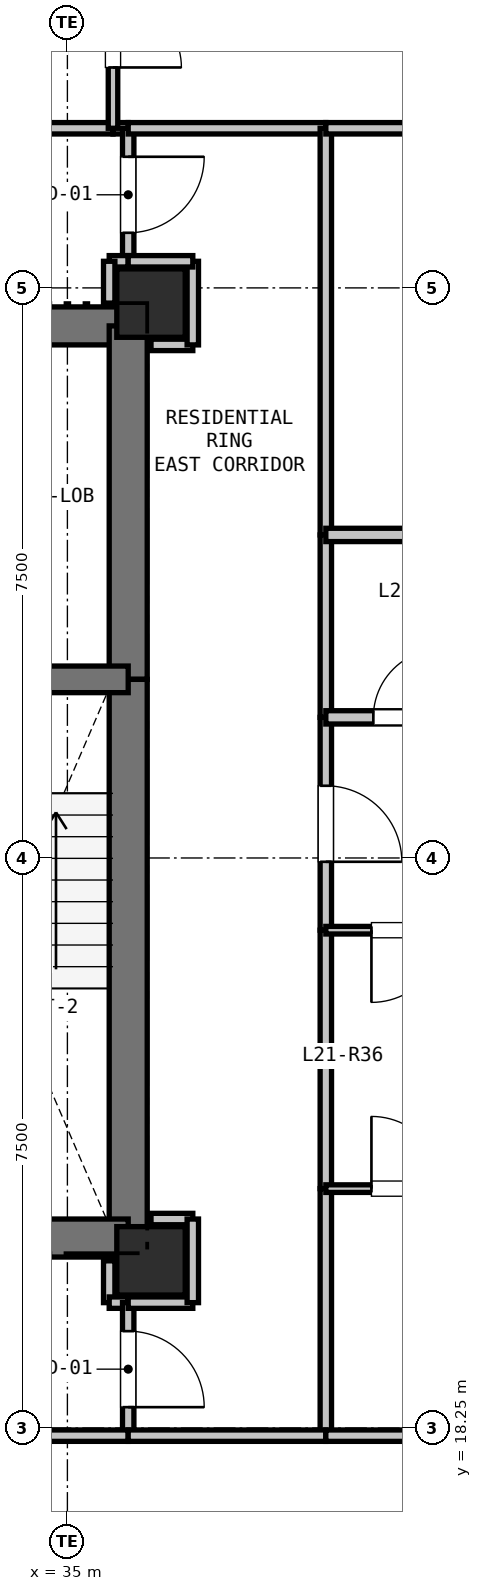
"""IFC4 building model, lengths in metres.
Left out: names, types, materials, properties, quantities, classifications, styles, units other than length and angle.
Written with IfcOpenShell. Run it as: python <this file> out.ifc"""

import sys

from ifc_helpers import new_model, si_unit, direction, frame, frame_2d, origin, origin_2d, place, context, subcontext, project, spatial, rectangle, extrude, element, fill, save


model = new_model("IFC4")
c1 = context("Model", 3, precision=1e-05, world=origin(), true_north=direction((0.0, 1.0)))
c2 = subcontext(c1, "Body", "Model", "MODEL_VIEW")
j1 = project(units=[si_unit("LENGTHUNIT", "METRE"), si_unit("PLANEANGLEUNIT", "RADIAN")], contexts=[c1])
p1 = place(None, origin())
s1 = spatial("IfcSite", under=j1, at=p1, CompositionType="ELEMENT")
p2 = place(p1, origin())
s2 = spatial("IfcBuilding", under=s1, at=p2, CompositionType="ELEMENT")
p3 = place(p2, frame((0.0, 0.0, 80.1)))
s3 = spatial("IfcBuildingStorey", under=s2, at=p3, CompositionType="ELEMENT", Elevation=80.1)
for number, where, z_axis, x_axis in (
    (1, (36.1, 33.05, 0.0), (0.0, 0.0, 1.0), (1.0, 0.0, 0.0)),
    (2, (36.1, 20.45, 0.0), (0.0, 0.0, 1.0), (1.0, 0.0, 0.0)),
):
    element("IfcColumn", number, at=place(p3, frame(where, z_axis=z_axis, x_axis=x_axis)), inside=s3, PredefinedType="COLUMN", context=c2, shape_type="SweptSolid", body=[
        extrude(rectangle(XDim=0.9, YDim=0.9, at=origin_2d()), origin(), (0.0, 0.0, 1.0), 3.3),
    ])
p4 = place(p3, frame((32.35, 32.75, 0.0), z_axis=(0.0, 0.0, 1.0), x_axis=(1.0, 0.0, 0.0)))
e3 = element("IfcWall", 3, at=p4, inside=s3, PredefinedType="SHEAR", context=c2, shape_type="SweptSolid", body=[
    extrude(rectangle(XDim=3.45, YDim=0.5, at=frame_2d((1.725, 0.0))), origin(), (0.0, 0.0, 1.0), 3.05),
])
p5 = place(p4, frame((0.65, 0.0, 0.0)))
e4 = element("IfcOpeningElement", 4, at=p5, cuts=e3, PredefinedType="OPENING", context=c2, shape_type="SweptSolid", body=[
    extrude(rectangle(XDim=1.15, YDim=2.15, at=frame_2d((0.575, 1.075))), frame((0.0, 0.26, 0.0), z_axis=(0.0, -1.0, 0.0), x_axis=(1.0, 0.0, 0.0)), (0.0, 0.0, 1.0), 0.52),
])
p6 = place(p3, frame((35.8, 32.75, 0.0), z_axis=(0.0, 0.0, 1.0), x_axis=(0.0, -1.0, 0.0)))
e5 = element("IfcWall", 5, at=p6, inside=s3, PredefinedType="SHEAR", context=c2, shape_type="SweptSolid", body=[
    extrude(rectangle(XDim=4.65, YDim=0.5, at=frame_2d((2.325, 0.0))), origin(), (0.0, 0.0, 1.0), 3.05),
])
p7 = place(p3, frame((35.8, 28.1, 0.0), z_axis=(0.0, 0.0, 1.0), x_axis=(0.0, -1.0, 0.0)))
e6 = element("IfcWall", 6, at=p7, inside=s3, PredefinedType="SHEAR", context=c2, shape_type="SweptSolid", body=[
    extrude(rectangle(XDim=7.35, YDim=0.5, at=frame_2d((3.675, 0.0))), origin(), (0.0, 0.0, 1.0), 3.05),
])
p8 = place(p3, frame((35.8, 20.75, 0.0), z_axis=(0.0, 0.0, 1.0), x_axis=(-1.0, 0.0, 0.0)))
e7 = element("IfcWall", 7, at=p8, inside=s3, PredefinedType="SHEAR", context=c2, shape_type="SweptSolid", body=[
    extrude(rectangle(XDim=3.45, YDim=0.5, at=frame_2d((1.725, 0.0))), origin(), (0.0, 0.0, 1.0), 3.05),
])
p9 = place(p3, frame((32.35, 28.1, 0.0), z_axis=(0.0, 0.0, 1.0), x_axis=(1.0, 0.0, 0.0)))
e8 = element("IfcWall", 8, at=p9, inside=s3, PredefinedType="SHEAR", context=c2, shape_type="SweptSolid", body=[
    extrude(rectangle(XDim=3.45, YDim=0.35, at=frame_2d((1.725, 0.0))), origin(), (0.0, 0.0, 1.0), 3.05),
])
p10 = place(p9, frame((1.15, 0.0, 0.0)))
e9 = element("IfcOpeningElement", 9, at=p10, cuts=e8, PredefinedType="OPENING", context=c2, shape_type="SweptSolid", body=[
    extrude(rectangle(XDim=1.15, YDim=2.15, at=frame_2d((0.575, 1.075))), frame((0.0, 0.185, 0.0), z_axis=(0.0, -1.0, 0.0), x_axis=(1.0, 0.0, 0.0)), (0.0, 0.0, 1.0), 0.37),
])
p11 = place(p3, frame((35.55, 20.45, 0.0), z_axis=(0.0, 0.0, 1.0), x_axis=(0.0, -1.0, 0.0)))
e10 = element("IfcWall", 10, at=p11, inside=s3, PredefinedType="PARTITIONING", context=c2, shape_type="SweptSolid", body=[
    extrude(rectangle(XDim=0.55, YDim=0.15, at=frame_2d((0.275, 0.0))), origin(), (0.0, 0.0, 1.0), 2.498),
])
p12 = place(p3, frame((35.55, 19.9, 0.0), z_axis=(0.0, 0.0, 1.0), x_axis=(1.0, 0.0, 0.0)))
e11 = element("IfcWall", 11, at=p12, inside=s3, PredefinedType="PARTITIONING", context=c2, shape_type="SweptSolid", body=[
    extrude(rectangle(XDim=0.25, YDim=0.15, at=frame_2d((0.125, 0.0))), origin(), (0.0, 0.0, 1.0), 3.05),
])
p13 = place(p3, frame((35.8, 19.9, 0.0), z_axis=(0.0, 0.0, 1.0), x_axis=(0.0, -1.0, 0.0)))
e12 = element("IfcWall", 12, at=p13, inside=s3, PredefinedType="PARTITIONING", context=c2, shape_type="SweptSolid", body=[
    extrude(rectangle(XDim=1.75, YDim=0.15, at=frame_2d((0.875, 0.0))), origin(), (0.0, 0.0, 1.0), 3.05),
])
p14 = place(p13, frame((0.375, 0.0, 0.0)))
e13 = element("IfcOpeningElement", 13, at=p14, cuts=e12, PredefinedType="OPENING", context=c2, shape_type="SweptSolid", body=[
    extrude(rectangle(XDim=1.0, YDim=2.15, at=frame_2d((0.5, 1.075))), frame((0.0, 0.085, 0.0), z_axis=(0.0, -1.0, 0.0), x_axis=(1.0, 0.0, 0.0)), (0.0, 0.0, 1.0), 0.17),
])
p15 = place(p3, frame((35.8, 18.15, 0.0), z_axis=(0.0, 0.0, 1.0), x_axis=(-1.0, 0.0, 0.0)))
e14 = element("IfcWall", 14, at=p15, inside=s3, PredefinedType="PARTITIONING", context=c2, shape_type="SweptSolid", body=[
    extrude(rectangle(XDim=2.2, YDim=0.15, at=frame_2d((1.1, 0.0))), origin(), (0.0, 0.0, 1.0), 3.05),
])
p16 = place(p3, frame((32.0, 35.35, 0.0), z_axis=(0.0, 0.0, 1.0), x_axis=(1.0, 0.0, 0.0)))
e15 = element("IfcWall", 15, at=p16, inside=s3, PredefinedType="PARTITIONING", context=c2, shape_type="SweptSolid", body=[
    extrude(rectangle(XDim=3.6, YDim=0.15, at=frame_2d((1.8, 0.0))), origin(), (0.0, 0.0, 1.0), 3.05),
])
p17 = place(p3, frame((35.6, 35.35, 0.0), z_axis=(0.0, 0.0, 1.0), x_axis=(1.0, 0.0, 0.0)))
e16 = element("IfcWall", 16, at=p17, inside=s3, PredefinedType="PARTITIONING", context=c2, shape_type="SweptSolid", body=[
    extrude(rectangle(XDim=0.2, YDim=0.15, at=frame_2d((0.1, 0.0))), origin(), (0.0, 0.0, 1.0), 3.05),
])
p18 = place(p3, frame((35.8, 35.35, 0.0), z_axis=(0.0, 0.0, 1.0), x_axis=(0.0, -1.0, 0.0)))
e17 = element("IfcWall", 17, at=p18, inside=s3, PredefinedType="PARTITIONING", context=c2, shape_type="SweptSolid", body=[
    extrude(rectangle(XDim=1.75, YDim=0.15, at=frame_2d((0.875, 0.0))), origin(), (0.0, 0.0, 1.0), 3.05),
])
p19 = place(p18, frame((0.375, 0.0, 0.0)))
e18 = element("IfcOpeningElement", 18, at=p19, cuts=e17, PredefinedType="OPENING", context=c2, shape_type="SweptSolid", body=[
    extrude(rectangle(XDim=1.0, YDim=2.15, at=frame_2d((0.5, 1.075))), frame((0.0, 0.085, 0.0), z_axis=(0.0, -1.0, 0.0), x_axis=(1.0, 0.0, 0.0)), (0.0, 0.0, 1.0), 0.17),
])
p20 = place(p3, frame((35.8, 33.6, 0.0), z_axis=(0.0, 0.0, 1.0), x_axis=(-1.0, 0.0, 0.0)))
e19 = element("IfcWall", 19, at=p20, inside=s3, PredefinedType="PARTITIONING", context=c2, shape_type="SweptSolid", body=[
    extrude(rectangle(XDim=0.25, YDim=0.15, at=frame_2d((0.125, 0.0))), origin(), (0.0, 0.0, 1.0), 3.05),
])
p21 = place(p3, frame((35.55, 33.6, 0.0), z_axis=(0.0, 0.0, 1.0), x_axis=(0.0, -1.0, 0.0)))
e20 = element("IfcWall", 20, at=p21, inside=s3, PredefinedType="PARTITIONING", context=c2, shape_type="SweptSolid", body=[
    extrude(rectangle(XDim=0.55, YDim=0.15, at=frame_2d((0.275, 0.0))), origin(), (0.0, 0.0, 1.0), 2.498),
])
for number, where, z_axis, x_axis in (
    (21, (36.65, 21.0, 0.0), (0.0, 0.0, 1.0), (-1.0, 0.0, 0.0)),
    (22, (36.1, 32.5, 0.0), (0.0, 0.0, 1.0), (1.0, 0.0, 0.0)),
):
    element("IfcWall", number, at=place(p3, frame(where, z_axis=z_axis, x_axis=x_axis)), inside=s3, PredefinedType="PARTITIONING", context=c2, shape_type="SweptSolid", body=[
        extrude(rectangle(XDim=0.55, YDim=0.15, at=frame_2d((0.275, 0.0))), origin(), (0.0, 0.0, 1.0), 2.498),
    ])
p22 = place(p3, frame((36.65, 32.5, 0.0), z_axis=(0.0, 0.0, 1.0), x_axis=(0.0, 1.0, 0.0)))
e23 = element("IfcWall", 23, at=p22, inside=s3, PredefinedType="PARTITIONING", context=c2, shape_type="SweptSolid", body=[
    extrude(rectangle(XDim=1.1, YDim=0.15, at=frame_2d((0.55, 0.0))), origin(), (0.0, 0.0, 1.0), 2.423),
])
p23 = place(p3, frame((36.65, 33.6, 0.0), z_axis=(0.0, 0.0, 1.0), x_axis=(-1.0, 0.0, 0.0)))
e24 = element("IfcWall", 24, at=p23, inside=s3, PredefinedType="PARTITIONING", context=c2, shape_type="SweptSolid", body=[
    extrude(rectangle(XDim=0.85, YDim=0.15, at=frame_2d((0.425, 0.0))), origin(), (0.0, 0.0, 1.0), 2.423),
])
p24 = place(p3, frame((35.8, 35.35, 0.0), z_axis=(0.0, 0.0, 1.0), x_axis=(1.0, 0.0, 0.0)))
e25 = element("IfcWall", 25, at=p24, inside=s3, PredefinedType="PARTITIONING", context=c2, shape_type="SweptSolid", body=[
    extrude(rectangle(XDim=2.6, YDim=0.15, at=frame_2d((1.3, 0.0))), origin(), (0.0, 0.0, 1.0), 2.423),
])
p25 = place(p3, frame((38.4, 35.35, 0.0), z_axis=(0.0, 0.0, 1.0), x_axis=(0.0, -1.0, 0.0)))
e26 = element("IfcWall", 26, at=p25, inside=s3, PredefinedType="PARTITIONING", context=c2, shape_type="SweptSolid", body=[
    extrude(rectangle(XDim=5.35, YDim=0.15, at=frame_2d((2.675, 0.0))), origin(), (0.0, 0.0, 1.0), 3.05),
])
p26 = place(p3, frame((38.4, 30.0, 0.0), z_axis=(0.0, 0.0, 1.0), x_axis=(0.0, -1.0, 0.0)))
e27 = element("IfcWall", 27, at=p26, inside=s3, PredefinedType="PARTITIONING", context=c2, shape_type="SweptSolid", body=[
    extrude(rectangle(XDim=2.4, YDim=0.15, at=frame_2d((1.2, 0.0))), origin(), (0.0, 0.0, 1.0), 3.05),
])
p27 = place(p3, frame((38.4, 27.6, 0.0), z_axis=(0.0, 0.0, 1.0), x_axis=(0.0, -1.0, 0.0)))
e28 = element("IfcWall", 28, at=p27, inside=s3, PredefinedType="PARTITIONING", context=c2, shape_type="SweptSolid", body=[
    extrude(rectangle(XDim=2.8, YDim=0.15, at=frame_2d((1.4, 0.0))), origin(), (0.0, 0.0, 1.0), 3.05),
])
p28 = place(p27, frame((0.9, 0.0, 0.0)))
e29 = element("IfcOpeningElement", 29, at=p28, cuts=e28, PredefinedType="OPENING", context=c2, shape_type="SweptSolid", body=[
    extrude(rectangle(XDim=1.0, YDim=2.15, at=frame_2d((0.5, 1.075))), frame((0.0, 0.085, 0.0), z_axis=(0.0, -1.0, 0.0), x_axis=(1.0, 0.0, 0.0)), (0.0, 0.0, 1.0), 0.17),
])
p29 = place(p3, frame((38.4, 24.8, 0.0), z_axis=(0.0, 0.0, 1.0), x_axis=(0.0, -1.0, 0.0)))
e30 = element("IfcWall", 30, at=p29, inside=s3, PredefinedType="PARTITIONING", context=c2, shape_type="SweptSolid", body=[
    extrude(rectangle(XDim=3.4, YDim=0.15, at=frame_2d((1.7, 0.0))), origin(), (0.0, 0.0, 1.0), 3.05),
])
p30 = place(p3, frame((38.4, 21.4, 0.0), z_axis=(0.0, 0.0, 1.0), x_axis=(0.0, -1.0, 0.0)))
e31 = element("IfcWall", 31, at=p30, inside=s3, PredefinedType="PARTITIONING", context=c2, shape_type="SweptSolid", body=[
    extrude(rectangle(XDim=3.25, YDim=0.15, at=frame_2d((1.625, 0.0))), origin(), (0.0, 0.0, 1.0), 3.05),
])
p31 = place(p3, frame((38.4, 18.15, 0.0), z_axis=(0.0, 0.0, 1.0), x_axis=(-1.0, 0.0, 0.0)))
e32 = element("IfcWall", 32, at=p31, inside=s3, PredefinedType="PARTITIONING", context=c2, shape_type="SweptSolid", body=[
    extrude(rectangle(XDim=2.6, YDim=0.15, at=frame_2d((1.3, 0.0))), origin(), (0.0, 0.0, 1.0), 2.423),
])
p32 = place(p3, frame((35.8, 19.9, 0.0), z_axis=(0.0, 0.0, 1.0), x_axis=(1.0, 0.0, 0.0)))
e33 = element("IfcWall", 33, at=p32, inside=s3, PredefinedType="PARTITIONING", context=c2, shape_type="SweptSolid", body=[
    extrude(rectangle(XDim=0.85, YDim=0.15, at=frame_2d((0.425, 0.0))), origin(), (0.0, 0.0, 1.0), 2.423),
])
p33 = place(p3, frame((36.65, 19.9, 0.0), z_axis=(0.0, 0.0, 1.0), x_axis=(0.0, 1.0, 0.0)))
e34 = element("IfcWall", 34, at=p33, inside=s3, PredefinedType="PARTITIONING", context=c2, shape_type="SweptSolid", body=[
    extrude(rectangle(XDim=1.1, YDim=0.15, at=frame_2d((0.55, 0.0))), origin(), (0.0, 0.0, 1.0), 3.05),
])
p34 = place(p3, frame((40.55, 24.8, 0.0), z_axis=(0.0, 0.0, 1.0), x_axis=(-1.0, 0.0, 0.0)))
e35 = element("IfcWall", 35, at=p34, inside=s3, PredefinedType="PARTITIONING", context=c2, shape_type="SweptSolid", body=[
    extrude(rectangle(XDim=2.15, YDim=0.1, at=frame_2d((1.075, 0.0))), origin(), (0.0, 0.0, 1.0), 3.05),
])
p35 = place(p34, frame((0.6, 0.0, 0.0)))
e36 = element("IfcOpeningElement", 36, at=p35, cuts=e35, PredefinedType="OPENING", context=c2, shape_type="SweptSolid", body=[
    extrude(rectangle(XDim=0.95, YDim=2.1, at=frame_2d((0.475, 1.05))), frame((0.0, 0.06, 0.0), z_axis=(0.0, -1.0, 0.0), x_axis=(1.0, 0.0, 0.0)), (0.0, 0.0, 1.0), 0.12),
])
p36 = place(p3, frame((38.4, 27.6, 0.0), z_axis=(0.0, 0.0, 1.0), x_axis=(1.0, 0.0, 0.0)))
e37 = element("IfcWall", 37, at=p36, inside=s3, PredefinedType="PLUMBINGWALL", context=c2, shape_type="SweptSolid", body=[
    extrude(rectangle(XDim=2.15, YDim=0.175, at=frame_2d((1.075, 0.0))), origin(), (0.0, 0.0, 1.0), 3.05),
])
p37 = place(p36, frame((0.625, 0.0, 0.0)))
e38 = element("IfcOpeningElement", 38, at=p37, cuts=e37, PredefinedType="OPENING", context=c2, shape_type="SweptSolid", body=[
    extrude(rectangle(XDim=0.9, YDim=2.1, at=frame_2d((0.45, 1.05))), frame((0.0, 0.097, 0.0), z_axis=(0.0, -1.0, 0.0), x_axis=(1.0, 0.0, 0.0)), (0.0, 0.0, 1.0), 0.195),
])
p38 = place(p3, frame((35.6, 37.85, 0.0), z_axis=(0.0, 0.0, 1.0), x_axis=(0.0, -1.0, 0.0)))
e39 = element("IfcWall", 39, at=p38, inside=s3, PredefinedType="PARTITIONING", context=c2, shape_type="SweptSolid", body=[
    extrude(rectangle(XDim=2.5, YDim=0.125, at=frame_2d((1.25, 0.0))), origin(), (0.0, 0.0, 1.0), 3.05),
])
p39 = place(p38, frame((0.8, 0.0, 0.0)))
e40 = element("IfcOpeningElement", 40, at=p39, cuts=e39, PredefinedType="OPENING", context=c2, shape_type="SweptSolid", body=[
    extrude(rectangle(XDim=0.9, YDim=2.1, at=frame_2d((0.45, 1.05))), frame((0.0, 0.073, 0.0), z_axis=(0.0, -1.0, 0.0), x_axis=(1.0, 0.0, 0.0)), (0.0, 0.0, 1.0), 0.145),
])
p40 = place(p3, frame((38.4, 18.15, 0.0), z_axis=(0.0, 0.0, 1.0), x_axis=(1.0, 0.0, 0.0)))
e41 = element("IfcWall", 41, at=p40, inside=s3, PredefinedType="PARTITIONING", context=c2, shape_type="SweptSolid", body=[
    extrude(rectangle(XDim=4.473, YDim=0.15, at=frame_2d((2.237, 0.0))), origin(), (0.0, 0.0, 1.0), 2.365),
])
p41 = place(p3, frame((38.4, 30.0, 0.0), z_axis=(0.0, 0.0, 1.0), x_axis=(1.0, 0.0, 0.0)))
e42 = element("IfcWall", 42, at=p41, inside=s3, PredefinedType="PLUMBINGWALL", context=c2, shape_type="SweptSolid", body=[
    extrude(rectangle(XDim=2.15, YDim=0.175, at=frame_2d((1.075, 0.0))), origin(), (0.0, 0.0, 1.0), 3.05),
])
p42 = place(p3, frame((38.4, 21.4, 0.0), z_axis=(0.0, 0.0, 1.0), x_axis=(1.0, 0.0, 0.0)))
e43 = element("IfcWall", 43, at=p42, inside=s3, PredefinedType="PARTITIONING", context=c2, shape_type="SweptSolid", body=[
    extrude(rectangle(XDim=2.15, YDim=0.1, at=frame_2d((1.075, 0.0))), origin(), (0.0, 0.0, 1.0), 3.05),
])
p43 = place(p42, frame((0.6, 0.0, 0.0)))
e44 = element("IfcOpeningElement", 44, at=p43, cuts=e43, PredefinedType="OPENING", context=c2, shape_type="SweptSolid", body=[
    extrude(rectangle(XDim=0.95, YDim=2.1, at=frame_2d((0.475, 1.05))), frame((0.0, 0.06, 0.0), z_axis=(0.0, -1.0, 0.0), x_axis=(1.0, 0.0, 0.0)), (0.0, 0.0, 1.0), 0.12),
])
p44 = place(p3, frame((42.873, 35.35, 0.0), z_axis=(0.0, 0.0, 1.0), x_axis=(-1.0, 0.0, 0.0)))
e45 = element("IfcWall", 45, at=p44, inside=s3, PredefinedType="PARTITIONING", context=c2, shape_type="SweptSolid", body=[
    extrude(rectangle(XDim=4.473, YDim=0.15, at=frame_2d((2.237, 0.0))), origin(), (0.0, 0.0, 1.0), 2.365),
])
p45 = place(p14, origin())
e46 = element("IfcDoor", 46, at=p45, inside=s3, OperationType="SINGLE_SWING_RIGHT", PredefinedType="DOOR", context=c2, shape_type="SweptSolid", body=[
    extrude(rectangle(XDim=1.0, YDim=2.15, at=frame_2d((0.5, 1.075))), frame((0.0, 0.025, 0.0), z_axis=(0.0, -1.0, 0.0), x_axis=(1.0, 0.0, 0.0)), (0.0, 0.0, 1.0), 0.05),
])
fill(e13, e46)
p46 = place(p19, origin())
e47 = element("IfcDoor", 47, at=p46, inside=s3, OperationType="SINGLE_SWING_LEFT", PredefinedType="DOOR", context=c2, shape_type="SweptSolid", body=[
    extrude(rectangle(XDim=1.0, YDim=2.15, at=frame_2d((0.5, 1.075))), frame((0.0, 0.025, 0.0), z_axis=(0.0, -1.0, 0.0), x_axis=(1.0, 0.0, 0.0)), (0.0, 0.0, 1.0), 0.05),
])
fill(e18, e47)
p47 = place(p28, origin())
e48 = element("IfcDoor", 48, at=p47, inside=s3, OperationType="SINGLE_SWING_RIGHT", PredefinedType="DOOR", context=c2, shape_type="SweptSolid", body=[
    extrude(rectangle(XDim=1.0, YDim=2.15, at=frame_2d((0.5, 1.075))), frame((0.0, 0.025, 0.0), z_axis=(0.0, -1.0, 0.0), x_axis=(1.0, 0.0, 0.0)), (0.0, 0.0, 1.0), 0.05),
])
fill(e29, e48)
p48 = place(p37, origin())
e49 = element("IfcDoor", 49, at=p48, inside=s3, OperationType="SINGLE_SWING_RIGHT", PredefinedType="DOOR", context=c2, shape_type="SweptSolid", body=[
    extrude(rectangle(XDim=0.9, YDim=2.1, at=frame_2d((0.45, 1.05))), frame((0.0, 0.025, 0.0), z_axis=(0.0, -1.0, 0.0), x_axis=(1.0, 0.0, 0.0)), (0.0, 0.0, 1.0), 0.05),
])
fill(e38, e49)
p49 = place(p35, origin())
e50 = element("IfcDoor", 50, at=p49, inside=s3, OperationType="SINGLE_SWING_RIGHT", PredefinedType="DOOR", context=c2, shape_type="SweptSolid", body=[
    extrude(rectangle(XDim=0.95, YDim=2.1, at=frame_2d((0.475, 1.05))), frame((0.0, 0.025, 0.0), z_axis=(0.0, -1.0, 0.0), x_axis=(1.0, 0.0, 0.0)), (0.0, 0.0, 1.0), 0.05),
])
fill(e36, e50)
p50 = place(p43, origin())
e51 = element("IfcDoor", 51, at=p50, inside=s3, OperationType="SINGLE_SWING_LEFT", PredefinedType="DOOR", context=c2, shape_type="SweptSolid", body=[
    extrude(rectangle(XDim=0.95, YDim=2.1, at=frame_2d((0.475, 1.05))), frame((0.0, 0.025, 0.0), z_axis=(0.0, -1.0, 0.0), x_axis=(1.0, 0.0, 0.0)), (0.0, 0.0, 1.0), 0.05),
])
fill(e44, e51)
p51 = place(p39, origin())
e52 = element("IfcDoor", 52, at=p51, inside=s3, OperationType="SINGLE_SWING_RIGHT", PredefinedType="DOOR", context=c2, shape_type="SweptSolid", body=[
    extrude(rectangle(XDim=0.9, YDim=2.1, at=frame_2d((0.45, 1.05))), frame((0.0, 0.025, 0.0), z_axis=(0.0, -1.0, 0.0), x_axis=(1.0, 0.0, 0.0)), (0.0, 0.0, 1.0), 0.05),
])
fill(e40, e52)
save(model, sys.argv[1])
